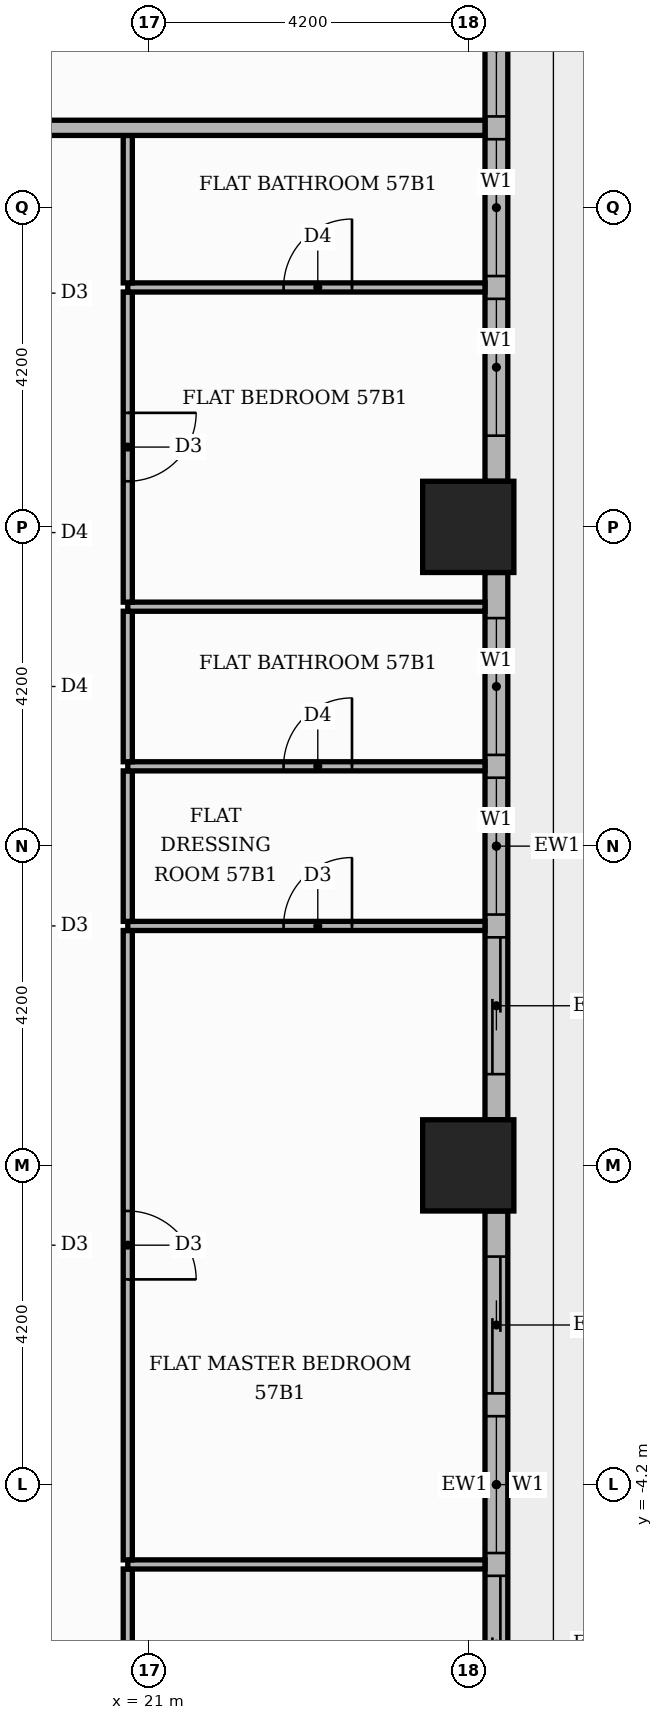
"""IFC4 building model, lengths in metres.
Left out: names, types, materials, properties, quantities, classifications, styles, units other than length and angle.
Written with IfcOpenShell. Run it as: python <this file> out.ifc"""

import sys

from ifc_helpers import new_model, si_unit, direction, frame, frame_2d, origin, origin_2d, place, context, subcontext, project, spatial, rectangle, extrude, element, fill, save


model = new_model("IFC4")
c1 = context("Model", 3, precision=1e-05, world=origin(), true_north=direction((0.0, 1.0)))
c2 = subcontext(c1, "Body", "Model", "MODEL_VIEW")
j1 = project(units=[si_unit("LENGTHUNIT", "METRE"), si_unit("PLANEANGLEUNIT", "RADIAN")], contexts=[c1])
p1 = place(None, origin())
s1 = spatial("IfcSite", under=j1, at=p1, CompositionType="ELEMENT")
p2 = place(p1, origin())
s2 = spatial("IfcBuilding", under=s1, at=p2, CompositionType="ELEMENT")
p3 = place(p2, frame((0.0, 0.0, 240.6)))
s3 = spatial("IfcBuildingStorey", under=s2, at=p3, CompositionType="ELEMENT", Elevation=240.6)
for number, where, z_axis, x_axis in (
    (1, (25.2, 0.0, -0.42), (0.0, 0.0, 1.0), (1.0, 0.0, 0.0)),
    (2, (25.2, 8.4, -0.42), (0.0, 0.0, 1.0), (1.0, 0.0, 0.0)),
):
    element("IfcColumn", number, at=place(p3, frame(where, z_axis=z_axis, x_axis=x_axis)), inside=s3, PredefinedType="COLUMN", context=c2, shape_type="SweptSolid", body=[
        extrude(rectangle(XDim=1.2, YDim=1.2, at=origin_2d()), origin(), (0.0, 0.0, 1.0), 4.32),
    ])
p4 = place(p3, frame((25.57, -7.8, 0.0), z_axis=(0.0, 0.0, 1.0), x_axis=(0.0, 1.0, 0.0)))
e3 = element("IfcWall", 3, at=p4, inside=s3, PredefinedType="STANDARD", context=c2, shape_type="SweptSolid", body=[
    extrude(rectangle(XDim=7.2, YDim=0.3, at=frame_2d((3.6, 0.0))), origin(), (0.0, 0.0, 1.0), 3.48),
])
p5 = place(p4, frame((0.6, 0.0, 0.0)))
e4 = element("IfcOpeningElement", 4, at=p5, cuts=e3, PredefinedType="OPENING", context=c2, shape_type="SweptSolid", body=[
    extrude(rectangle(XDim=1.8, YDim=2.4, at=frame_2d((0.9, 1.2))), frame((0.0, 0.16, 0.0), z_axis=(0.0, -1.0, 0.0), x_axis=(1.0, 0.0, 0.0)), (0.0, 0.0, 1.0), 0.32),
])
p6 = place(p4, frame((2.7, 0.0, 0.9)))
e5 = element("IfcOpeningElement", 5, at=p6, cuts=e3, PredefinedType="OPENING", context=c2, shape_type="SweptSolid", body=[
    extrude(rectangle(XDim=1.8, YDim=2.1, at=frame_2d((0.9, 1.05))), frame((0.0, 0.16, 0.0), z_axis=(0.0, -1.0, 0.0), x_axis=(1.0, 0.0, 0.0)), (0.0, 0.0, 1.0), 0.32),
])
p7 = place(p4, frame((4.8, 0.0, 0.0)))
e6 = element("IfcOpeningElement", 6, at=p7, cuts=e3, PredefinedType="OPENING", context=c2, shape_type="SweptSolid", body=[
    extrude(rectangle(XDim=1.8, YDim=2.4, at=frame_2d((0.9, 1.2))), frame((0.0, 0.16, 0.0), z_axis=(0.0, -1.0, 0.0), x_axis=(1.0, 0.0, 0.0)), (0.0, 0.0, 1.0), 0.32),
])
p8 = place(p3, frame((25.57, 0.6, 0.0), z_axis=(0.0, 0.0, 1.0), x_axis=(0.0, 1.0, 0.0)))
e7 = element("IfcWall", 7, at=p8, inside=s3, PredefinedType="STANDARD", context=c2, shape_type="SweptSolid", body=[
    extrude(rectangle(XDim=7.2, YDim=0.3, at=frame_2d((3.6, 0.0))), origin(), (0.0, 0.0, 1.0), 3.48),
])
p9 = place(p8, frame((0.6, 0.0, 0.0)))
e8 = element("IfcOpeningElement", 8, at=p9, cuts=e7, PredefinedType="OPENING", context=c2, shape_type="SweptSolid", body=[
    extrude(rectangle(XDim=1.8, YDim=2.4, at=frame_2d((0.9, 1.2))), frame((0.0, 0.16, 0.0), z_axis=(0.0, -1.0, 0.0), x_axis=(1.0, 0.0, 0.0)), (0.0, 0.0, 1.0), 0.32),
])
p10 = place(p8, frame((2.7, 0.0, 0.9)))
e9 = element("IfcOpeningElement", 9, at=p10, cuts=e7, PredefinedType="OPENING", context=c2, shape_type="SweptSolid", body=[
    extrude(rectangle(XDim=1.8, YDim=2.1, at=frame_2d((0.9, 1.05))), frame((0.0, 0.16, 0.0), z_axis=(0.0, -1.0, 0.0), x_axis=(1.0, 0.0, 0.0)), (0.0, 0.0, 1.0), 0.32),
])
p11 = place(p8, frame((4.8, 0.0, 0.9)))
e10 = element("IfcOpeningElement", 10, at=p11, cuts=e7, PredefinedType="OPENING", context=c2, shape_type="SweptSolid", body=[
    extrude(rectangle(XDim=1.8, YDim=2.1, at=frame_2d((0.9, 1.05))), frame((0.0, 0.16, 0.0), z_axis=(0.0, -1.0, 0.0), x_axis=(1.0, 0.0, 0.0)), (0.0, 0.0, 1.0), 0.32),
])
p12 = place(p3, frame((25.57, 9.0, 0.0), z_axis=(0.0, 0.0, 1.0), x_axis=(0.0, 1.0, 0.0)))
e11 = element("IfcWall", 11, at=p12, inside=s3, PredefinedType="STANDARD", context=c2, shape_type="SweptSolid", body=[
    extrude(rectangle(XDim=7.2, YDim=0.3, at=frame_2d((3.6, 0.0))), origin(), (0.0, 0.0, 1.0), 3.48),
])
p13 = place(p12, frame((0.6, 0.0, 0.9)))
e12 = element("IfcOpeningElement", 12, at=p13, cuts=e11, PredefinedType="OPENING", context=c2, shape_type="SweptSolid", body=[
    extrude(rectangle(XDim=1.8, YDim=2.1, at=frame_2d((0.9, 1.05))), frame((0.0, 0.16, 0.0), z_axis=(0.0, -1.0, 0.0), x_axis=(1.0, 0.0, 0.0)), (0.0, 0.0, 1.0), 0.32),
])
p14 = place(p12, frame((2.7, 0.0, 0.9)))
e13 = element("IfcOpeningElement", 13, at=p14, cuts=e11, PredefinedType="OPENING", context=c2, shape_type="SweptSolid", body=[
    extrude(rectangle(XDim=1.8, YDim=2.1, at=frame_2d((0.9, 1.05))), frame((0.0, 0.16, 0.0), z_axis=(0.0, -1.0, 0.0), x_axis=(1.0, 0.0, 0.0)), (0.0, 0.0, 1.0), 0.32),
])
p15 = place(p12, frame((4.8, 0.0, 0.9)))
e14 = element("IfcOpeningElement", 14, at=p15, cuts=e11, PredefinedType="OPENING", context=c2, shape_type="SweptSolid", body=[
    extrude(rectangle(XDim=1.8, YDim=2.1, at=frame_2d((0.9, 1.05))), frame((0.0, 0.16, 0.0), z_axis=(0.0, -1.0, 0.0), x_axis=(1.0, 0.0, 0.0)), (0.0, 0.0, 1.0), 0.32),
])
p16 = place(p3, frame((20.72, -11.49, 0.0), z_axis=(0.0, 0.0, 1.0), x_axis=(0.0, 1.0, 0.0)))
e15 = element("IfcWall", 15, at=p16, inside=s3, PredefinedType="PARTITIONING", context=c2, shape_type="SweptSolid", body=[
    extrude(rectangle(XDim=6.18, YDim=0.12, at=frame_2d((3.09, 0.0))), origin(), (0.0, 0.0, 1.0), 3.48),
])
p17 = place(p16, frame((2.59, 0.0, 0.0)))
e16 = element("IfcOpeningElement", 16, at=p17, cuts=e15, PredefinedType="OPENING", context=c2, shape_type="SweptSolid", body=[
    extrude(rectangle(XDim=1.0, YDim=2.1, at=frame_2d((0.5, 1.05))), frame((0.0, 0.07, 0.0), z_axis=(0.0, -1.0, 0.0), x_axis=(1.0, 0.0, 0.0)), (0.0, 0.0, 1.0), 0.14),
])
p18 = place(p3, frame((20.72, -5.25, 0.0), z_axis=(0.0, 0.0, 1.0), x_axis=(1.0, 0.0, 0.0)))
e17 = element("IfcWall", 17, at=p18, inside=s3, PredefinedType="PARTITIONING", context=c2, shape_type="SweptSolid", body=[
    extrude(rectangle(XDim=4.7, YDim=0.12, at=frame_2d((2.35, 0.0))), origin(), (0.0, 0.0, 1.0), 3.48),
])
p19 = place(p3, frame((20.72, -5.19, 0.0), z_axis=(0.0, 0.0, 1.0), x_axis=(0.0, 1.0, 0.0)))
e18 = element("IfcWall", 18, at=p19, inside=s3, PredefinedType="PARTITIONING", context=c2, shape_type="SweptSolid", body=[
    extrude(rectangle(XDim=8.28, YDim=0.12, at=frame_2d((4.14, 0.0))), origin(), (0.0, 0.0, 1.0), 3.48),
])
p20 = place(p19, frame((3.69, 0.0, 0.0)))
e19 = element("IfcOpeningElement", 19, at=p20, cuts=e18, PredefinedType="OPENING", context=c2, shape_type="SweptSolid", body=[
    extrude(rectangle(XDim=0.9, YDim=2.1, at=frame_2d((0.45, 1.05))), frame((0.0, 0.07, 0.0), z_axis=(0.0, -1.0, 0.0), x_axis=(1.0, 0.0, 0.0)), (0.0, 0.0, 1.0), 0.14),
])
p21 = place(p3, frame((20.72, 3.15, 0.0), z_axis=(0.0, 0.0, 1.0), x_axis=(1.0, 0.0, 0.0)))
e20 = element("IfcWall", 20, at=p21, inside=s3, PredefinedType="PARTITIONING", context=c2, shape_type="SweptSolid", body=[
    extrude(rectangle(XDim=4.7, YDim=0.12, at=frame_2d((2.35, 0.0))), origin(), (0.0, 0.0, 1.0), 3.48),
])
p22 = place(p21, frame((2.05, 0.0, 0.0)))
e21 = element("IfcOpeningElement", 21, at=p22, cuts=e20, PredefinedType="OPENING", context=c2, shape_type="SweptSolid", body=[
    extrude(rectangle(XDim=0.9, YDim=2.1, at=frame_2d((0.45, 1.05))), frame((0.0, 0.07, 0.0), z_axis=(0.0, -1.0, 0.0), x_axis=(1.0, 0.0, 0.0)), (0.0, 0.0, 1.0), 0.14),
])
p23 = place(p3, frame((20.72, 3.21, 0.0), z_axis=(0.0, 0.0, 1.0), x_axis=(0.0, 1.0, 0.0)))
e22 = element("IfcWall", 22, at=p23, inside=s3, PredefinedType="PARTITIONING", context=c2, shape_type="SweptSolid", body=[
    extrude(rectangle(XDim=1.98, YDim=0.12, at=frame_2d((0.99, 0.0))), origin(), (0.0, 0.0, 1.0), 3.48),
])
p24 = place(p3, frame((20.72, 5.25, 0.0), z_axis=(0.0, 0.0, 1.0), x_axis=(1.0, 0.0, 0.0)))
e23 = element("IfcWall", 23, at=p24, inside=s3, PredefinedType="PARTITIONING", context=c2, shape_type="SweptSolid", body=[
    extrude(rectangle(XDim=4.7, YDim=0.12, at=frame_2d((2.35, 0.0))), origin(), (0.0, 0.0, 1.0), 3.48),
])
p25 = place(p24, frame((2.05, 0.0, 0.0)))
e24 = element("IfcOpeningElement", 24, at=p25, cuts=e23, PredefinedType="OPENING", context=c2, shape_type="SweptSolid", body=[
    extrude(rectangle(XDim=0.9, YDim=2.1, at=frame_2d((0.45, 1.05))), frame((0.0, 0.07, 0.0), z_axis=(0.0, -1.0, 0.0), x_axis=(1.0, 0.0, 0.0)), (0.0, 0.0, 1.0), 0.14),
])
p26 = place(p3, frame((20.72, 5.31, 0.0), z_axis=(0.0, 0.0, 1.0), x_axis=(0.0, 1.0, 0.0)))
e25 = element("IfcWall", 25, at=p26, inside=s3, PredefinedType="PARTITIONING", context=c2, shape_type="SweptSolid", body=[
    extrude(rectangle(XDim=1.98, YDim=0.12, at=frame_2d((0.99, 0.0))), origin(), (0.0, 0.0, 1.0), 3.48),
])
p27 = place(p3, frame((20.72, 7.35, 0.0), z_axis=(0.0, 0.0, 1.0), x_axis=(1.0, 0.0, 0.0)))
e26 = element("IfcWall", 26, at=p27, inside=s3, PredefinedType="PARTITIONING", context=c2, shape_type="SweptSolid", body=[
    extrude(rectangle(XDim=4.7, YDim=0.12, at=frame_2d((2.35, 0.0))), origin(), (0.0, 0.0, 1.0), 3.48),
])
p28 = place(p3, frame((20.72, 7.41, 0.0), z_axis=(0.0, 0.0, 1.0), x_axis=(0.0, 1.0, 0.0)))
e27 = element("IfcWall", 27, at=p28, inside=s3, PredefinedType="PARTITIONING", context=c2, shape_type="SweptSolid", body=[
    extrude(rectangle(XDim=4.08, YDim=0.12, at=frame_2d((2.04, 0.0))), origin(), (0.0, 0.0, 1.0), 3.48),
])
p29 = place(p28, frame((1.59, 0.0, 0.0)))
e28 = element("IfcOpeningElement", 28, at=p29, cuts=e27, PredefinedType="OPENING", context=c2, shape_type="SweptSolid", body=[
    extrude(rectangle(XDim=0.9, YDim=2.1, at=frame_2d((0.45, 1.05))), frame((0.0, 0.07, 0.0), z_axis=(0.0, -1.0, 0.0), x_axis=(1.0, 0.0, 0.0)), (0.0, 0.0, 1.0), 0.14),
])
p30 = place(p3, frame((20.72, 11.55, 0.0), z_axis=(0.0, 0.0, 1.0), x_axis=(1.0, 0.0, 0.0)))
e29 = element("IfcWall", 29, at=p30, inside=s3, PredefinedType="PARTITIONING", context=c2, shape_type="SweptSolid", body=[
    extrude(rectangle(XDim=4.7, YDim=0.12, at=frame_2d((2.35, 0.0))), origin(), (0.0, 0.0, 1.0), 3.48),
])
p31 = place(p30, frame((2.05, 0.0, 0.0)))
e30 = element("IfcOpeningElement", 30, at=p31, cuts=e29, PredefinedType="OPENING", context=c2, shape_type="SweptSolid", body=[
    extrude(rectangle(XDim=0.9, YDim=2.1, at=frame_2d((0.45, 1.05))), frame((0.0, 0.07, 0.0), z_axis=(0.0, -1.0, 0.0), x_axis=(1.0, 0.0, 0.0)), (0.0, 0.0, 1.0), 0.14),
])
p32 = place(p3, frame((20.72, 11.61, 0.0), z_axis=(0.0, 0.0, 1.0), x_axis=(0.0, 1.0, 0.0)))
e31 = element("IfcWall", 31, at=p32, inside=s3, PredefinedType="PARTITIONING", context=c2, shape_type="SweptSolid", body=[
    extrude(rectangle(XDim=1.94, YDim=0.12, at=frame_2d((0.97, 0.0))), origin(), (0.0, 0.0, 1.0), 3.48),
])
p33 = place(p3, frame((-13.65, 13.65, 0.0), z_axis=(0.0, 0.0, 1.0), x_axis=(1.0, 0.0, 0.0)))
e32 = element("IfcWall", 32, at=p33, inside=s3, PredefinedType="PARTITIONING", context=c2, shape_type="SweptSolid", body=[
    extrude(rectangle(XDim=39.07, YDim=0.2, at=frame_2d((19.535, 0.0))), origin(), (0.0, 0.0, 1.0), 3.48),
])
p34 = place(p33, frame((24.65, 0.0, 0.0)))
e33 = element("IfcOpeningElement", 33, at=p34, cuts=e32, PredefinedType="OPENING", context=c2, shape_type="SweptSolid", body=[
    extrude(rectangle(XDim=1.1, YDim=2.4, at=frame_2d((0.55, 1.2))), frame((0.0, 0.11, 0.0), z_axis=(0.0, -1.0, 0.0), x_axis=(1.0, 0.0, 0.0)), (0.0, 0.0, 1.0), 0.22),
])
p35 = place(p33, frame((12.05, 0.0, 0.0)))
e34 = element("IfcOpeningElement", 34, at=p35, cuts=e32, PredefinedType="OPENING", context=c2, shape_type="SweptSolid", body=[
    extrude(rectangle(XDim=1.1, YDim=2.4, at=frame_2d((0.55, 1.2))), frame((0.0, 0.11, 0.0), z_axis=(0.0, -1.0, 0.0), x_axis=(1.0, 0.0, 0.0)), (0.0, 0.0, 1.0), 0.22),
])
p36 = place(p5, origin())
e35 = element("IfcDoor", 35, at=p36, inside=s3, OperationType="SLIDING_TO_LEFT", PredefinedType="DOOR", context=c2, shape_type="SweptSolid", body=[
    extrude(rectangle(XDim=1.8, YDim=2.4, at=frame_2d((0.9, 1.2))), frame((0.0, 0.025, 0.0), z_axis=(0.0, -1.0, 0.0), x_axis=(1.0, 0.0, 0.0)), (0.0, 0.0, 1.0), 0.05),
])
fill(e4, e35)
p37 = place(p6, origin())
e36 = element("IfcWindow", 36, at=p37, inside=s3, PartitioningType="SINGLE_PANEL", PredefinedType="WINDOW", context=c2, shape_type="SweptSolid", body=[
    extrude(rectangle(XDim=1.8, YDim=2.1, at=frame_2d((0.9, 1.05))), frame((0.0, 0.03, 0.0), z_axis=(0.0, -1.0, 0.0), x_axis=(1.0, 0.0, 0.0)), (0.0, 0.0, 1.0), 0.06),
])
fill(e5, e36)
p38 = place(p7, origin())
e37 = element("IfcDoor", 37, at=p38, inside=s3, OperationType="SLIDING_TO_RIGHT", PredefinedType="DOOR", context=c2, shape_type="SweptSolid", body=[
    extrude(rectangle(XDim=1.8, YDim=2.4, at=frame_2d((0.9, 1.2))), frame((0.0, 0.025, 0.0), z_axis=(0.0, -1.0, 0.0), x_axis=(1.0, 0.0, 0.0)), (0.0, 0.0, 1.0), 0.05),
])
fill(e6, e37)
p39 = place(p9, origin())
e38 = element("IfcDoor", 38, at=p39, inside=s3, OperationType="SLIDING_TO_LEFT", PredefinedType="DOOR", context=c2, shape_type="SweptSolid", body=[
    extrude(rectangle(XDim=1.8, YDim=2.4, at=frame_2d((0.9, 1.2))), frame((0.0, 0.025, 0.0), z_axis=(0.0, -1.0, 0.0), x_axis=(1.0, 0.0, 0.0)), (0.0, 0.0, 1.0), 0.05),
])
fill(e8, e38)
p40 = place(p10, origin())
e39 = element("IfcWindow", 39, at=p40, inside=s3, PartitioningType="SINGLE_PANEL", PredefinedType="WINDOW", context=c2, shape_type="SweptSolid", body=[
    extrude(rectangle(XDim=1.8, YDim=2.1, at=frame_2d((0.9, 1.05))), frame((0.0, 0.03, 0.0), z_axis=(0.0, -1.0, 0.0), x_axis=(1.0, 0.0, 0.0)), (0.0, 0.0, 1.0), 0.06),
])
fill(e9, e39)
p41 = place(p11, origin())
e40 = element("IfcWindow", 40, at=p41, inside=s3, PartitioningType="SINGLE_PANEL", PredefinedType="WINDOW", context=c2, shape_type="SweptSolid", body=[
    extrude(rectangle(XDim=1.8, YDim=2.1, at=frame_2d((0.9, 1.05))), frame((0.0, 0.03, 0.0), z_axis=(0.0, -1.0, 0.0), x_axis=(1.0, 0.0, 0.0)), (0.0, 0.0, 1.0), 0.06),
])
fill(e10, e40)
p42 = place(p13, origin())
e41 = element("IfcWindow", 41, at=p42, inside=s3, PartitioningType="SINGLE_PANEL", PredefinedType="WINDOW", context=c2, shape_type="SweptSolid", body=[
    extrude(rectangle(XDim=1.8, YDim=2.1, at=frame_2d((0.9, 1.05))), frame((0.0, 0.03, 0.0), z_axis=(0.0, -1.0, 0.0), x_axis=(1.0, 0.0, 0.0)), (0.0, 0.0, 1.0), 0.06),
])
fill(e12, e41)
p43 = place(p14, origin())
e42 = element("IfcWindow", 42, at=p43, inside=s3, PartitioningType="SINGLE_PANEL", PredefinedType="WINDOW", context=c2, shape_type="SweptSolid", body=[
    extrude(rectangle(XDim=1.8, YDim=2.1, at=frame_2d((0.9, 1.05))), frame((0.0, 0.03, 0.0), z_axis=(0.0, -1.0, 0.0), x_axis=(1.0, 0.0, 0.0)), (0.0, 0.0, 1.0), 0.06),
])
fill(e13, e42)
p44 = place(p15, origin())
e43 = element("IfcWindow", 43, at=p44, inside=s3, PartitioningType="SINGLE_PANEL", PredefinedType="WINDOW", context=c2, shape_type="SweptSolid", body=[
    extrude(rectangle(XDim=1.8, YDim=2.1, at=frame_2d((0.9, 1.05))), frame((0.0, 0.03, 0.0), z_axis=(0.0, -1.0, 0.0), x_axis=(1.0, 0.0, 0.0)), (0.0, 0.0, 1.0), 0.06),
])
fill(e14, e43)
p45 = place(p20, frame((0.9, 0.0, 0.0), z_axis=(0.0, 0.0, 1.0), x_axis=(-1.0, 0.0, 0.0)))
e44 = element("IfcDoor", 44, at=p45, inside=s3, OperationType="SINGLE_SWING_LEFT", PredefinedType="DOOR", context=c2, shape_type="SweptSolid", body=[
    extrude(rectangle(XDim=0.9, YDim=2.1, at=frame_2d((0.45, 1.05))), frame((0.0, 0.025, 0.0), z_axis=(0.0, -1.0, 0.0), x_axis=(1.0, 0.0, 0.0)), (0.0, 0.0, 1.0), 0.05),
])
fill(e19, e44)
p46 = place(p22, origin())
e45 = element("IfcDoor", 45, at=p46, inside=s3, OperationType="SINGLE_SWING_RIGHT", PredefinedType="DOOR", context=c2, shape_type="SweptSolid", body=[
    extrude(rectangle(XDim=0.9, YDim=2.1, at=frame_2d((0.45, 1.05))), frame((0.0, 0.025, 0.0), z_axis=(0.0, -1.0, 0.0), x_axis=(1.0, 0.0, 0.0)), (0.0, 0.0, 1.0), 0.05),
])
fill(e21, e45)
p47 = place(p25, origin())
e46 = element("IfcDoor", 46, at=p47, inside=s3, OperationType="SINGLE_SWING_RIGHT", PredefinedType="DOOR", context=c2, shape_type="SweptSolid", body=[
    extrude(rectangle(XDim=0.9, YDim=2.1, at=frame_2d((0.45, 1.05))), frame((0.0, 0.025, 0.0), z_axis=(0.0, -1.0, 0.0), x_axis=(1.0, 0.0, 0.0)), (0.0, 0.0, 1.0), 0.05),
])
fill(e24, e46)
p48 = place(p29, frame((0.9, 0.0, 0.0), z_axis=(0.0, 0.0, 1.0), x_axis=(-1.0, 0.0, 0.0)))
e47 = element("IfcDoor", 47, at=p48, inside=s3, OperationType="SINGLE_SWING_RIGHT", PredefinedType="DOOR", context=c2, shape_type="SweptSolid", body=[
    extrude(rectangle(XDim=0.9, YDim=2.1, at=frame_2d((0.45, 1.05))), frame((0.0, 0.025, 0.0), z_axis=(0.0, -1.0, 0.0), x_axis=(1.0, 0.0, 0.0)), (0.0, 0.0, 1.0), 0.05),
])
fill(e28, e47)
p49 = place(p31, origin())
e48 = element("IfcDoor", 48, at=p49, inside=s3, OperationType="SINGLE_SWING_RIGHT", PredefinedType="DOOR", context=c2, shape_type="SweptSolid", body=[
    extrude(rectangle(XDim=0.9, YDim=2.1, at=frame_2d((0.45, 1.05))), frame((0.0, 0.025, 0.0), z_axis=(0.0, -1.0, 0.0), x_axis=(1.0, 0.0, 0.0)), (0.0, 0.0, 1.0), 0.05),
])
fill(e30, e48)
save(model, sys.argv[1])
